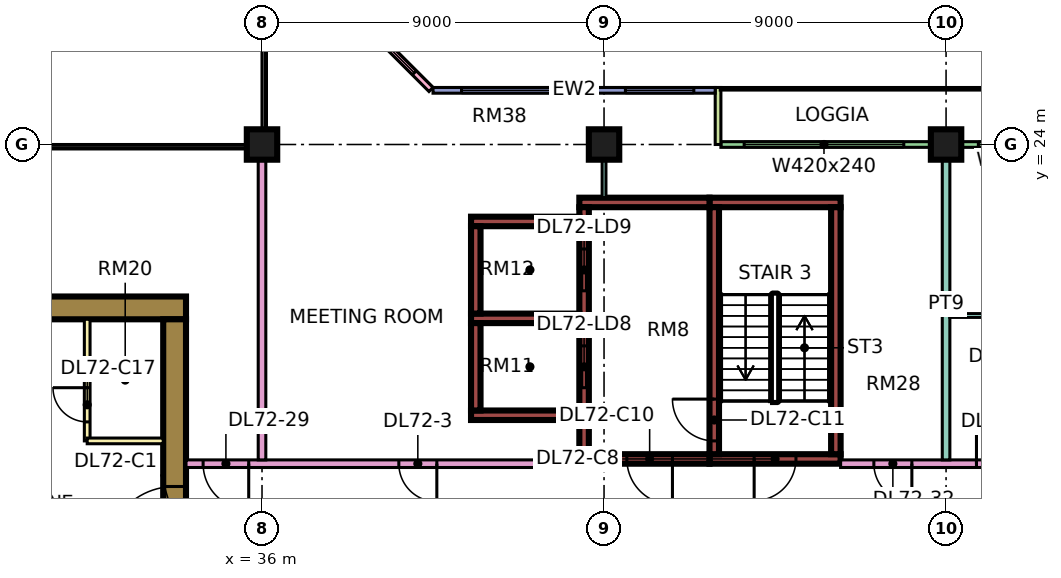
"""IFC4 building model, lengths in metres.
Left out: names, types, materials, properties, quantities, classifications, styles, units other than length and angle.
Written with IfcOpenShell. Run it as: python <this file> out.ifc"""

import sys

from ifc_helpers import new_model, si_unit, direction, frame, frame_2d, origin, origin_2d, place, context, subcontext, project, spatial, rectangle, extrude, element, fill, save


model = new_model("IFC4")
c1 = context("Model", 3, precision=1e-05, world=origin(), true_north=direction((0.0, 1.0)))
c2 = subcontext(c1, "Body", "Model", "MODEL_VIEW")
j1 = project(units=[si_unit("LENGTHUNIT", "METRE"), si_unit("PLANEANGLEUNIT", "RADIAN")], contexts=[c1])
p1 = place(None, origin())
s1 = spatial("IfcSite", under=j1, at=p1, CompositionType="ELEMENT")
p2 = place(p1, origin())
s2 = spatial("IfcBuilding", under=s1, at=p2, CompositionType="ELEMENT")
p3 = place(p2, frame((0.0, 0.0, 307.15)))
s3 = spatial("IfcBuildingStorey", under=s2, at=p3, CompositionType="ELEMENT", Elevation=307.15)
for number, where, z_axis, x_axis in (
    (1, (36.0, 24.0, 0.0), (0.0, 0.0, 1.0), (1.0, 0.0, 0.0)),
    (2, (45.0, 24.0, 0.0), (0.0, 0.0, 1.0), (1.0, 0.0, 0.0)),
    (3, (54.0, 24.0, 0.0), (0.0, 0.0, 1.0), (1.0, 0.0, 0.0)),
):
    element("IfcColumn", number, at=place(p3, frame(where, z_axis=z_axis, x_axis=x_axis)), inside=s3, PredefinedType="COLUMN", context=c2, shape_type="SweptSolid", body=[
        extrude(rectangle(XDim=0.8, YDim=0.8, at=origin_2d()), origin(), (0.0, 0.0, 1.0), 3.75),
    ])
p4 = place(p3, frame((9.0, 19.7, 0.0), z_axis=(0.0, 0.0, 1.0), x_axis=(1.0, 0.0, 0.0)))
e4 = element("IfcWall", 4, at=p4, inside=s3, PredefinedType="SHEAR", context=c2, shape_type="SweptSolid", body=[
    extrude(rectangle(XDim=25.0, YDim=0.6, at=frame_2d((12.5, 0.0))), origin(), (0.0, 0.0, 1.0), 3.75),
])
p5 = place(p4, frame((19.1, 0.0, 0.0)))
e5 = element("IfcOpeningElement", 5, at=p5, cuts=e4, PredefinedType="OPENING", context=c2, shape_type="SweptSolid", body=[
    extrude(rectangle(XDim=1.8, YDim=2.4, at=frame_2d((0.9, 1.2))), frame((0.0, 0.31, 0.0), z_axis=(0.0, -1.0, 0.0), x_axis=(1.0, 0.0, 0.0)), (0.0, 0.0, 1.0), 0.62),
])
p6 = place(p3, frame((33.7, 7.6, 0.0), z_axis=(0.0, 0.0, 1.0), x_axis=(0.0, 1.0, 0.0)))
e6 = element("IfcWall", 6, at=p6, inside=s3, PredefinedType="SHEAR", context=c2, shape_type="SweptSolid", body=[
    extrude(rectangle(XDim=11.8, YDim=0.6, at=frame_2d((5.9, 0.0))), origin(), (0.0, 0.0, 1.0), 3.75),
])
p7 = place(p6, frame((5.6, 0.0, 0.0)))
e7 = element("IfcOpeningElement", 7, at=p7, cuts=e6, PredefinedType="OPENING", context=c2, shape_type="SweptSolid", body=[
    extrude(rectangle(XDim=1.8, YDim=2.4, at=frame_2d((0.9, 1.2))), frame((0.0, 0.31, 0.0), z_axis=(0.0, -1.0, 0.0), x_axis=(1.0, 0.0, 0.0)), (0.0, 0.0, 1.0), 0.62),
])
p8 = place(p3, frame((47.775, 15.725, 0.0), z_axis=(0.0, 0.0, 1.0), x_axis=(1.0, 0.0, 0.0)))
e8 = element("IfcWall", 8, at=p8, inside=s3, PredefinedType="SHEAR", context=c2, shape_type="SweptSolid", body=[
    extrude(rectangle(XDim=3.45, YDim=0.25, at=frame_2d((1.725, 0.0))), origin(), (0.0, 0.0, 1.0), 3.75),
])
p9 = place(p8, frame((1.175, 0.0, 0.0)))
e9 = element("IfcOpeningElement", 9, at=p9, cuts=e8, PredefinedType="OPENING", context=c2, shape_type="SweptSolid", body=[
    extrude(rectangle(XDim=1.1, YDim=2.2, at=frame_2d((0.55, 1.1))), frame((0.0, 0.135, 0.0), z_axis=(0.0, -1.0, 0.0), x_axis=(1.0, 0.0, 0.0)), (0.0, 0.0, 1.0), 0.27),
])
p10 = place(p3, frame((47.775, 22.475, 0.0), z_axis=(0.0, 0.0, 1.0), x_axis=(1.0, 0.0, 0.0)))
e10 = element("IfcWall", 10, at=p10, inside=s3, PredefinedType="SHEAR", context=c2, shape_type="SweptSolid", body=[
    extrude(rectangle(XDim=3.45, YDim=0.25, at=frame_2d((1.725, 0.0))), origin(), (0.0, 0.0, 1.0), 3.75),
])
p11 = place(p3, frame((47.9, 15.85, 0.0), z_axis=(0.0, 0.0, 1.0), x_axis=(0.0, 1.0, 0.0)))
e11 = element("IfcWall", 11, at=p11, inside=s3, PredefinedType="SHEAR", context=c2, shape_type="SweptSolid", body=[
    extrude(rectangle(XDim=6.5, YDim=0.25, at=frame_2d((3.25, 0.0))), origin(), (0.0, 0.0, 1.0), 3.75),
])
p12 = place(p11, frame((0.35, 0.0, 0.0)))
e12 = element("IfcOpeningElement", 12, at=p12, cuts=e11, PredefinedType="OPENING", context=c2, shape_type="SweptSolid", body=[
    extrude(rectangle(XDim=1.1, YDim=2.2, at=frame_2d((0.55, 1.1))), frame((0.0, 0.135, 0.0), z_axis=(0.0, -1.0, 0.0), x_axis=(1.0, 0.0, 0.0)), (0.0, 0.0, 1.0), 0.27),
])
p13 = place(p3, frame((51.1, 15.85, 0.0), z_axis=(0.0, 0.0, 1.0), x_axis=(0.0, 1.0, 0.0)))
e13 = element("IfcWall", 13, at=p13, inside=s3, PredefinedType="SHEAR", context=c2, shape_type="SweptSolid", body=[
    extrude(rectangle(XDim=6.5, YDim=0.25, at=frame_2d((3.25, 0.0))), origin(), (0.0, 0.0, 1.0), 3.75),
])
p14 = place(p3, frame((44.35, 15.725, 0.0), z_axis=(0.0, 0.0, 1.0), x_axis=(1.0, 0.0, 0.0)))
e14 = element("IfcWall", 14, at=p14, inside=s3, PredefinedType="SHEAR", context=c2, shape_type="SweptSolid", body=[
    extrude(rectangle(XDim=3.425, YDim=0.25, at=frame_2d((1.712, 0.0))), origin(), (0.0, 0.0, 1.0), 3.75),
])
p15 = place(p14, frame((1.25, 0.0, 0.0)))
e15 = element("IfcOpeningElement", 15, at=p15, cuts=e14, PredefinedType="OPENING", context=c2, shape_type="SweptSolid", body=[
    extrude(rectangle(XDim=1.2, YDim=2.2, at=frame_2d((0.6, 1.1))), frame((0.0, 0.135, 0.0), z_axis=(0.0, -1.0, 0.0), x_axis=(1.0, 0.0, 0.0)), (0.0, 0.0, 1.0), 0.27),
])
p16 = place(p3, frame((44.35, 22.475, 0.0), z_axis=(0.0, 0.0, 1.0), x_axis=(1.0, 0.0, 0.0)))
e16 = element("IfcWall", 16, at=p16, inside=s3, PredefinedType="SHEAR", context=c2, shape_type="SweptSolid", body=[
    extrude(rectangle(XDim=3.425, YDim=0.25, at=frame_2d((1.712, 0.0))), origin(), (0.0, 0.0, 1.0), 3.75),
])
p17 = place(p3, frame((44.475, 15.85, 0.0), z_axis=(0.0, 0.0, 1.0), x_axis=(0.0, 1.0, 0.0)))
e17 = element("IfcWall", 17, at=p17, inside=s3, PredefinedType="SHEAR", context=c2, shape_type="SweptSolid", body=[
    extrude(rectangle(XDim=6.5, YDim=0.25, at=frame_2d((3.25, 0.0))), origin(), (0.0, 0.0, 1.0), 3.75),
])
p18 = place(p17, frame((1.75, 0.0, 0.0)))
e18 = element("IfcOpeningElement", 18, at=p18, cuts=e17, PredefinedType="OPENING", context=c2, shape_type="SweptSolid", body=[
    extrude(rectangle(XDim=1.1, YDim=2.2, at=frame_2d((0.55, 1.1))), frame((0.0, 0.135, 0.0), z_axis=(0.0, -1.0, 0.0), x_axis=(1.0, 0.0, 0.0)), (0.0, 0.0, 1.0), 0.27),
])
p19 = place(p17, frame((4.3, 0.0, 0.0)))
e19 = element("IfcOpeningElement", 19, at=p19, cuts=e17, PredefinedType="OPENING", context=c2, shape_type="SweptSolid", body=[
    extrude(rectangle(XDim=1.1, YDim=2.2, at=frame_2d((0.55, 1.1))), frame((0.0, 0.135, 0.0), z_axis=(0.0, -1.0, 0.0), x_axis=(1.0, 0.0, 0.0)), (0.0, 0.0, 1.0), 0.27),
])
for number, where, z_axis, x_axis in (
    (20, (41.5, 16.875, 0.0), (0.0, 0.0, 1.0), (1.0, 0.0, 0.0)),
    (21, (41.5, 19.425, 0.0), (0.0, 0.0, 1.0), (1.0, 0.0, 0.0)),
    (22, (41.5, 21.975, 0.0), (0.0, 0.0, 1.0), (1.0, 0.0, 0.0)),
):
    element("IfcWall", number, at=place(p3, frame(where, z_axis=z_axis, x_axis=x_axis)), inside=s3, PredefinedType="SHEAR", context=c2, shape_type="SweptSolid", body=[
        extrude(rectangle(XDim=2.85, YDim=0.25, at=frame_2d((1.425, 0.0))), origin(), (0.0, 0.0, 1.0), 3.75),
    ])
for number, where, z_axis, x_axis in (
    (23, (41.625, 17.0, 0.0), (0.0, 0.0, 1.0), (0.0, 1.0, 0.0)),
    (24, (41.625, 19.55, 0.0), (0.0, 0.0, 1.0), (0.0, 1.0, 0.0)),
):
    element("IfcWall", number, at=place(p3, frame(where, z_axis=z_axis, x_axis=x_axis)), inside=s3, PredefinedType="SHEAR", context=c2, shape_type="SweptSolid", body=[
        extrude(rectangle(XDim=2.3, YDim=0.25, at=frame_2d((1.15, 0.0))), origin(), (0.0, 0.0, 1.0), 3.75),
    ])
p20 = place(p3, frame((61.425, 24.0, 0.0), z_axis=(0.0, 0.0, 1.0), x_axis=(-1.0, 0.0, 0.0)))
e25 = element("IfcWall", 25, at=p20, inside=s3, PredefinedType="SOLIDWALL", context=c2, shape_type="SweptSolid", body=[
    extrude(rectangle(XDim=13.35, YDim=0.15, at=frame_2d((6.675, 0.0))), origin(), (0.0, 0.0, 1.0), 3.35),
])
p21 = place(p20, frame((1.312, 0.0, 0.0)))
e26 = element("IfcOpeningElement", 26, at=p21, cuts=e25, PredefinedType="OPENING", context=c2, shape_type="SweptSolid", body=[
    extrude(rectangle(XDim=1.8, YDim=2.4, at=frame_2d((0.9, 1.2))), frame((0.0, 0.085, 0.0), z_axis=(0.0, -1.0, 0.0), x_axis=(1.0, 0.0, 0.0)), (0.0, 0.0, 1.0), 0.17),
])
p22 = place(p20, frame((4.775, 0.0, 0.45)))
e27 = element("IfcOpeningElement", 27, at=p22, cuts=e25, PredefinedType="OPENING", context=c2, shape_type="SweptSolid", body=[
    extrude(rectangle(XDim=1.8, YDim=2.4, at=frame_2d((0.9, 1.2))), frame((0.0, 0.085, 0.0), z_axis=(0.0, -1.0, 0.0), x_axis=(1.0, 0.0, 0.0)), (0.0, 0.0, 1.0), 0.17),
])
p23 = place(p20, frame((8.538, 0.0, 0.45)))
e28 = element("IfcOpeningElement", 28, at=p23, cuts=e25, PredefinedType="OPENING", context=c2, shape_type="SweptSolid", body=[
    extrude(rectangle(XDim=4.2, YDim=2.4, at=frame_2d((2.1, 1.2))), frame((0.0, 0.085, 0.0), z_axis=(0.0, -1.0, 0.0), x_axis=(1.0, 0.0, 0.0)), (0.0, 0.0, 1.0), 0.17),
])
p24 = place(p3, frame((48.0, 25.5, 0.0), z_axis=(0.0, 0.0, 1.0), x_axis=(0.0, -1.0, 0.0)))
e29 = element("IfcWall", 29, at=p24, inside=s3, PredefinedType="SOLIDWALL", context=c2, shape_type="SweptSolid", body=[
    extrude(rectangle(XDim=1.5, YDim=0.15, at=frame_2d((0.75, 0.0))), origin(), (0.0, 0.0, 1.0), 3.35),
])
p25 = place(p3, frame((47.925, 25.425, 0.0), z_axis=(0.0, 0.0, 1.0), x_axis=(-1.0, 0.0, 0.0)))
e30 = element("IfcWall", 30, at=p25, inside=s3, PredefinedType="SOLIDWALL", context=c2, shape_type="SweptSolid", body=[
    extrude(rectangle(XDim=7.425, YDim=0.15, at=frame_2d((3.712, 0.0))), origin(), (0.0, 0.0, 1.0), 3.35),
])
p26 = place(p25, frame((0.562, 0.0, 0.45)))
e31 = element("IfcOpeningElement", 31, at=p26, cuts=e30, PredefinedType="OPENING", context=c2, shape_type="SweptSolid", body=[
    extrude(rectangle(XDim=1.8, YDim=2.4, at=frame_2d((0.9, 1.2))), frame((0.0, 0.085, 0.0), z_axis=(0.0, -1.0, 0.0), x_axis=(1.0, 0.0, 0.0)), (0.0, 0.0, 1.0), 0.17),
])
p27 = place(p25, frame((3.675, 0.0, 0.45)))
e32 = element("IfcOpeningElement", 32, at=p27, cuts=e30, PredefinedType="OPENING", context=c2, shape_type="SweptSolid", body=[
    extrude(rectangle(XDim=3.0, YDim=2.4, at=frame_2d((1.5, 1.2))), frame((0.0, 0.085, 0.0), z_axis=(0.0, -1.0, 0.0), x_axis=(1.0, 0.0, 0.0)), (0.0, 0.0, 1.0), 0.17),
])
p28 = place(p3, frame((40.447, 25.447, 0.0), z_axis=(0.0, 0.0, 1.0), x_axis=(-0.707106781187, 0.707106781187, 0.0)))
e33 = element("IfcWall", 33, at=p28, inside=s3, PredefinedType="SOLIDWALL", context=c2, shape_type="SweptSolid", body=[
    extrude(rectangle(XDim=4.243, YDim=0.15, at=frame_2d((2.121, 0.0))), origin(), (0.0, 0.0, 1.0), 3.35),
])
p29 = place(p28, frame((0.621, 0.0, 0.45)))
e34 = element("IfcOpeningElement", 34, at=p29, cuts=e33, PredefinedType="OPENING", context=c2, shape_type="SweptSolid", body=[
    extrude(rectangle(XDim=3.0, YDim=2.4, at=frame_2d((1.5, 1.2))), frame((0.0, 0.085, 0.0), z_axis=(0.0, -1.0, 0.0), x_axis=(1.0, 0.0, 0.0)), (0.0, 0.0, 1.0), 0.17),
])
p30 = place(p3, frame((31.4, 16.2, 0.0), z_axis=(0.0, 0.0, 1.0), x_axis=(0.0, 1.0, 0.0)))
e35 = element("IfcWall", 35, at=p30, inside=s3, PredefinedType="PARTITIONING", context=c2, shape_type="SweptSolid", body=[
    extrude(rectangle(XDim=3.2, YDim=0.15, at=frame_2d((1.6, 0.0))), origin(), (0.0, 0.0, 1.0), 3.35),
])
p31 = place(p30, frame((0.5, 0.0, 0.0)))
e36 = element("IfcOpeningElement", 36, at=p31, cuts=e35, PredefinedType="OPENING", context=c2, shape_type="SweptSolid", body=[
    extrude(rectangle(XDim=0.9, YDim=2.1, at=frame_2d((0.45, 1.05))), frame((0.0, 0.085, 0.0), z_axis=(0.0, -1.0, 0.0), x_axis=(1.0, 0.0, 0.0)), (0.0, 0.0, 1.0), 0.17),
])
p32 = place(p3, frame((31.4, 16.2, 0.0), z_axis=(0.0, 0.0, 1.0), x_axis=(1.0, 0.0, 0.0)))
e37 = element("IfcWall", 37, at=p32, inside=s3, PredefinedType="PARTITIONING", context=c2, shape_type="SweptSolid", body=[
    extrude(rectangle(XDim=2.0, YDim=0.15, at=frame_2d((1.0, 0.0))), origin(), (0.0, 0.0, 1.0), 3.35),
])
p33 = place(p3, frame((34.0, 15.6, 0.0), z_axis=(0.0, 0.0, 1.0), x_axis=(1.0, 0.0, 0.0)))
e38 = element("IfcWall", 38, at=p33, inside=s3, PredefinedType="PARTITIONING", context=c2, shape_type="SweptSolid", body=[
    extrude(rectangle(XDim=10.35, YDim=0.2, at=frame_2d((5.175, 0.0))), origin(), (0.0, 0.0, 1.0), 3.35),
])
p34 = place(p33, frame((5.6, 0.0, 0.0)))
e39 = element("IfcOpeningElement", 39, at=p34, cuts=e38, PredefinedType="OPENING", context=c2, shape_type="SweptSolid", body=[
    extrude(rectangle(XDim=1.0, YDim=2.1, at=frame_2d((0.5, 1.05))), frame((0.0, 0.11, 0.0), z_axis=(0.0, -1.0, 0.0), x_axis=(1.0, 0.0, 0.0)), (0.0, 0.0, 1.0), 0.22),
])
p35 = place(p33, frame((0.45, 0.0, 0.0)))
e40 = element("IfcOpeningElement", 40, at=p35, cuts=e38, PredefinedType="OPENING", context=c2, shape_type="SweptSolid", body=[
    extrude(rectangle(XDim=1.2, YDim=2.1, at=frame_2d((0.6, 1.05))), frame((0.0, 0.11, 0.0), z_axis=(0.0, -1.0, 0.0), x_axis=(1.0, 0.0, 0.0)), (0.0, 0.0, 1.0), 0.22),
])
p36 = place(p3, frame((36.0, 15.7, 0.0), z_axis=(0.0, 0.0, 1.0), x_axis=(0.0, 1.0, 0.0)))
e41 = element("IfcWall", 41, at=p36, inside=s3, PredefinedType="PARTITIONING", context=c2, shape_type="SweptSolid", body=[
    extrude(rectangle(XDim=8.3, YDim=0.2, at=frame_2d((4.15, 0.0))), origin(), (0.0, 0.0, 1.0), 3.35),
])
p37 = place(p3, frame((45.0, 22.6, 0.0), z_axis=(0.0, 0.0, 1.0), x_axis=(0.0, 1.0, 0.0)))
e42 = element("IfcWall", 42, at=p37, inside=s3, PredefinedType="PARTITIONING", context=c2, shape_type="SweptSolid", body=[
    extrude(rectangle(XDim=1.4, YDim=0.1, at=frame_2d((0.7, 0.0))), origin(), (0.0, 0.0, 1.0), 3.35),
])
p38 = place(p3, frame((51.225, 15.6, 0.0), z_axis=(0.0, 0.0, 1.0), x_axis=(1.0, 0.0, 0.0)))
e43 = element("IfcWall", 43, at=p38, inside=s3, PredefinedType="PARTITIONING", context=c2, shape_type="SweptSolid", body=[
    extrude(rectangle(XDim=13.125, YDim=0.2, at=frame_2d((6.562, 0.0))), origin(), (0.0, 0.0, 1.0), 3.35),
])
p39 = place(p38, frame((3.575, 0.0, 0.0)))
e44 = element("IfcOpeningElement", 44, at=p39, cuts=e43, PredefinedType="OPENING", context=c2, shape_type="SweptSolid", body=[
    extrude(rectangle(XDim=1.0, YDim=2.1, at=frame_2d((0.5, 1.05))), frame((0.0, 0.11, 0.0), z_axis=(0.0, -1.0, 0.0), x_axis=(1.0, 0.0, 0.0)), (0.0, 0.0, 1.0), 0.22),
])
p40 = place(p38, frame((0.875, 0.0, 0.0)))
e45 = element("IfcOpeningElement", 45, at=p40, cuts=e43, PredefinedType="OPENING", context=c2, shape_type="SweptSolid", body=[
    extrude(rectangle(XDim=1.0, YDim=2.1, at=frame_2d((0.5, 1.05))), frame((0.0, 0.11, 0.0), z_axis=(0.0, -1.0, 0.0), x_axis=(1.0, 0.0, 0.0)), (0.0, 0.0, 1.0), 0.22),
])
p41 = place(p3, frame((54.0, 15.7, 0.0), z_axis=(0.0, 0.0, 1.0), x_axis=(0.0, 1.0, 0.0)))
e46 = element("IfcWall", 46, at=p41, inside=s3, PredefinedType="PARTITIONING", context=c2, shape_type="SweptSolid", body=[
    extrude(rectangle(XDim=8.226, YDim=0.2, at=frame_2d((4.113, 0.0))), origin(), (0.0, 0.0, 1.0), 3.35),
])
p42 = place(p3, frame((54.1, 19.5, 0.0), z_axis=(0.0, 0.0, 1.0), x_axis=(1.0, 0.0, 0.0)))
e47 = element("IfcWall", 47, at=p42, inside=s3, PredefinedType="PARTITIONING", context=c2, shape_type="SweptSolid", body=[
    extrude(rectangle(XDim=2.85, YDim=0.1, at=frame_2d((1.425, 0.0))), origin(), (0.0, 0.0, 1.0), 3.35),
])
p43 = place(p42, frame((0.95, 0.0, 0.0)))
e48 = element("IfcOpeningElement", 48, at=p43, cuts=e47, PredefinedType="OPENING", context=c2, shape_type="SweptSolid", body=[
    extrude(rectangle(XDim=0.9, YDim=2.1, at=frame_2d((0.45, 1.05))), frame((0.0, 0.06, 0.0), z_axis=(0.0, -1.0, 0.0), x_axis=(1.0, 0.0, 0.0)), (0.0, 0.0, 1.0), 0.12),
])
p44 = place(p22, origin())
e49 = element("IfcWindow", 49, at=p44, inside=s3, PartitioningType="SINGLE_PANEL", PredefinedType="WINDOW", context=c2, shape_type="SweptSolid", body=[
    extrude(rectangle(XDim=1.8, YDim=2.4, at=frame_2d((0.9, 1.2))), frame((0.0, 0.03, 0.0), z_axis=(0.0, -1.0, 0.0), x_axis=(1.0, 0.0, 0.0)), (0.0, 0.0, 1.0), 0.06),
])
fill(e27, e49)
p45 = place(p23, origin())
e50 = element("IfcWindow", 50, at=p45, inside=s3, PartitioningType="SINGLE_PANEL", PredefinedType="WINDOW", context=c2, shape_type="SweptSolid", body=[
    extrude(rectangle(XDim=4.2, YDim=2.4, at=frame_2d((2.1, 1.2))), frame((0.0, 0.03, 0.0), z_axis=(0.0, -1.0, 0.0), x_axis=(1.0, 0.0, 0.0)), (0.0, 0.0, 1.0), 0.06),
])
fill(e28, e50)
p46 = place(p26, origin())
e51 = element("IfcWindow", 51, at=p46, inside=s3, PartitioningType="SINGLE_PANEL", PredefinedType="WINDOW", context=c2, shape_type="SweptSolid", body=[
    extrude(rectangle(XDim=1.8, YDim=2.4, at=frame_2d((0.9, 1.2))), frame((0.0, 0.03, 0.0), z_axis=(0.0, -1.0, 0.0), x_axis=(1.0, 0.0, 0.0)), (0.0, 0.0, 1.0), 0.06),
])
fill(e31, e51)
p47 = place(p27, origin())
e52 = element("IfcWindow", 52, at=p47, inside=s3, PartitioningType="SINGLE_PANEL", PredefinedType="WINDOW", context=c2, shape_type="SweptSolid", body=[
    extrude(rectangle(XDim=3.0, YDim=2.4, at=frame_2d((1.5, 1.2))), frame((0.0, 0.03, 0.0), z_axis=(0.0, -1.0, 0.0), x_axis=(1.0, 0.0, 0.0)), (0.0, 0.0, 1.0), 0.06),
])
fill(e32, e52)
p48 = place(p29, origin())
e53 = element("IfcWindow", 53, at=p48, inside=s3, PartitioningType="SINGLE_PANEL", PredefinedType="WINDOW", context=c2, shape_type="SweptSolid", body=[
    extrude(rectangle(XDim=3.0, YDim=2.4, at=frame_2d((1.5, 1.2))), frame((0.0, 0.03, 0.0), z_axis=(0.0, -1.0, 0.0), x_axis=(1.0, 0.0, 0.0)), (0.0, 0.0, 1.0), 0.06),
])
fill(e34, e53)
p49 = place(p7, origin())
e54 = element("IfcDoor", 54, at=p49, inside=s3, OperationType="DOUBLE_DOOR_SINGLE_SWING", PredefinedType="DOOR", context=c2, shape_type="SweptSolid", body=[
    extrude(rectangle(XDim=1.8, YDim=2.4, at=frame_2d((0.9, 1.2))), frame((0.0, 0.025, 0.0), z_axis=(0.0, -1.0, 0.0), x_axis=(1.0, 0.0, 0.0)), (0.0, 0.0, 1.0), 0.05),
])
fill(e7, e54)
p50 = place(p9, frame((1.1, 0.0, 0.0), z_axis=(0.0, 0.0, 1.0), x_axis=(-1.0, 0.0, 0.0)))
e55 = element("IfcDoor", 55, at=p50, inside=s3, OperationType="SINGLE_SWING_LEFT", PredefinedType="DOOR", context=c2, shape_type="SweptSolid", body=[
    extrude(rectangle(XDim=1.1, YDim=2.2, at=frame_2d((0.55, 1.1))), frame((0.0, 0.025, 0.0), z_axis=(0.0, -1.0, 0.0), x_axis=(1.0, 0.0, 0.0)), (0.0, 0.0, 1.0), 0.05),
])
fill(e9, e55)
p51 = place(p15, origin())
e56 = element("IfcDoor", 56, at=p51, inside=s3, OperationType="SINGLE_SWING_RIGHT", PredefinedType="DOOR", context=c2, shape_type="SweptSolid", body=[
    extrude(rectangle(XDim=1.2, YDim=2.2, at=frame_2d((0.6, 1.1))), frame((0.0, 0.025, 0.0), z_axis=(0.0, -1.0, 0.0), x_axis=(1.0, 0.0, 0.0)), (0.0, 0.0, 1.0), 0.05),
])
fill(e15, e56)
p52 = place(p12, frame((1.1, 0.0, 0.0), z_axis=(0.0, 0.0, 1.0), x_axis=(-1.0, 0.0, 0.0)))
e57 = element("IfcDoor", 57, at=p52, inside=s3, OperationType="SINGLE_SWING_RIGHT", PredefinedType="DOOR", context=c2, shape_type="SweptSolid", body=[
    extrude(rectangle(XDim=1.1, YDim=2.2, at=frame_2d((0.55, 1.1))), frame((0.0, 0.025, 0.0), z_axis=(0.0, -1.0, 0.0), x_axis=(1.0, 0.0, 0.0)), (0.0, 0.0, 1.0), 0.05),
])
fill(e12, e57)
p53 = place(p18, origin())
e58 = element("IfcDoor", 58, at=p53, inside=s3, OperationType="DOUBLE_DOOR_SLIDING", PredefinedType="DOOR", context=c2, shape_type="SweptSolid", body=[
    extrude(rectangle(XDim=1.1, YDim=2.2, at=frame_2d((0.55, 1.1))), frame((0.0, 0.025, 0.0), z_axis=(0.0, -1.0, 0.0), x_axis=(1.0, 0.0, 0.0)), (0.0, 0.0, 1.0), 0.05),
])
fill(e18, e58)
p54 = place(p19, origin())
e59 = element("IfcDoor", 59, at=p54, inside=s3, OperationType="DOUBLE_DOOR_SLIDING", PredefinedType="DOOR", context=c2, shape_type="SweptSolid", body=[
    extrude(rectangle(XDim=1.1, YDim=2.2, at=frame_2d((0.55, 1.1))), frame((0.0, 0.025, 0.0), z_axis=(0.0, -1.0, 0.0), x_axis=(1.0, 0.0, 0.0)), (0.0, 0.0, 1.0), 0.05),
])
fill(e19, e59)
p55 = place(p31, frame((0.9, 0.0, 0.0), z_axis=(0.0, 0.0, 1.0), x_axis=(-1.0, 0.0, 0.0)))
e60 = element("IfcDoor", 60, at=p55, inside=s3, OperationType="SINGLE_SWING_RIGHT", PredefinedType="DOOR", context=c2, shape_type="SweptSolid", body=[
    extrude(rectangle(XDim=0.9, YDim=2.1, at=frame_2d((0.45, 1.05))), frame((0.0, 0.025, 0.0), z_axis=(0.0, -1.0, 0.0), x_axis=(1.0, 0.0, 0.0)), (0.0, 0.0, 1.0), 0.05),
])
fill(e36, e60)
p56 = place(p34, origin())
e61 = element("IfcDoor", 61, at=p56, inside=s3, OperationType="SINGLE_SWING_RIGHT", PredefinedType="DOOR", context=c2, shape_type="SweptSolid", body=[
    extrude(rectangle(XDim=1.0, YDim=2.1, at=frame_2d((0.5, 1.05))), frame((0.0, 0.025, 0.0), z_axis=(0.0, -1.0, 0.0), x_axis=(1.0, 0.0, 0.0)), (0.0, 0.0, 1.0), 0.05),
])
fill(e39, e61)
p57 = place(p39, origin())
e62 = element("IfcDoor", 62, at=p57, inside=s3, OperationType="SINGLE_SWING_LEFT", PredefinedType="DOOR", context=c2, shape_type="SweptSolid", body=[
    extrude(rectangle(XDim=1.0, YDim=2.1, at=frame_2d((0.5, 1.05))), frame((0.0, 0.025, 0.0), z_axis=(0.0, -1.0, 0.0), x_axis=(1.0, 0.0, 0.0)), (0.0, 0.0, 1.0), 0.05),
])
fill(e44, e62)
p58 = place(p35, origin())
e63 = element("IfcDoor", 63, at=p58, inside=s3, OperationType="SINGLE_SWING_RIGHT", PredefinedType="DOOR", context=c2, shape_type="SweptSolid", body=[
    extrude(rectangle(XDim=1.2, YDim=2.1, at=frame_2d((0.6, 1.05))), frame((0.0, 0.025, 0.0), z_axis=(0.0, -1.0, 0.0), x_axis=(1.0, 0.0, 0.0)), (0.0, 0.0, 1.0), 0.05),
])
fill(e40, e63)
p59 = place(p40, origin())
e64 = element("IfcDoor", 64, at=p59, inside=s3, OperationType="SINGLE_SWING_RIGHT", PredefinedType="DOOR", context=c2, shape_type="SweptSolid", body=[
    extrude(rectangle(XDim=1.0, YDim=2.1, at=frame_2d((0.5, 1.05))), frame((0.0, 0.025, 0.0), z_axis=(0.0, -1.0, 0.0), x_axis=(1.0, 0.0, 0.0)), (0.0, 0.0, 1.0), 0.05),
])
fill(e45, e64)
save(model, sys.argv[1])
